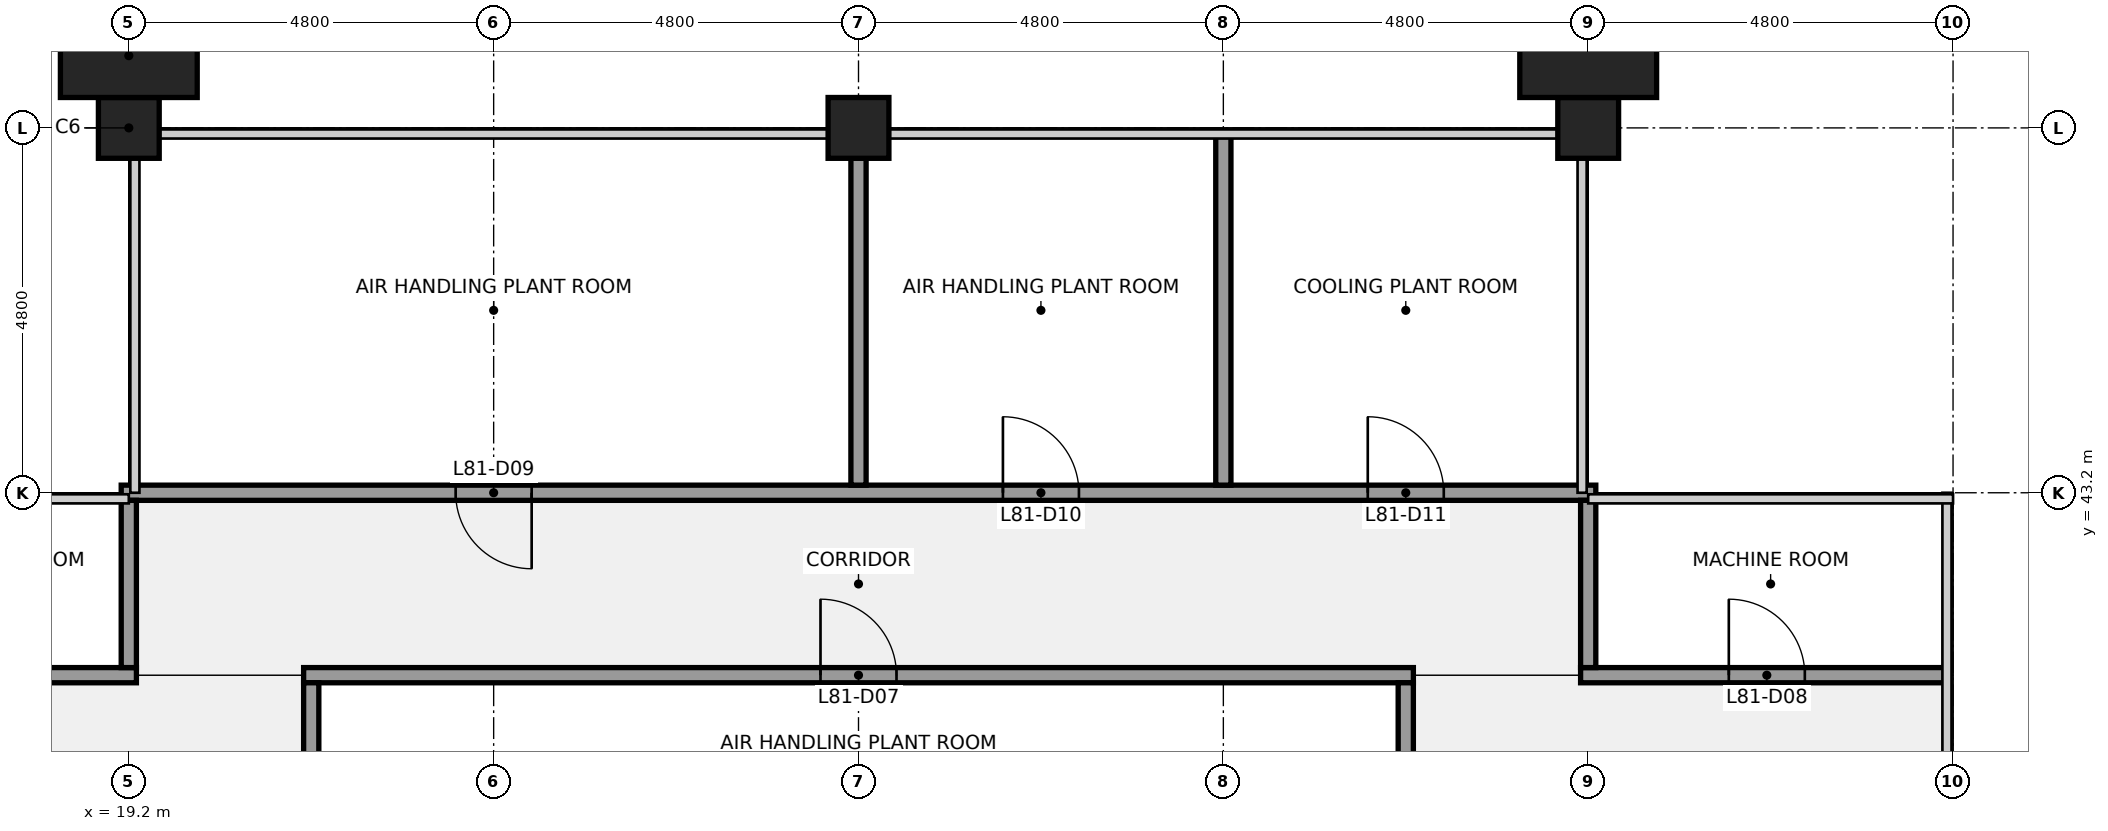
"""IFC4 building model, lengths in metres.
Left out: names, types, materials, properties, quantities, classifications, styles, units other than length and angle.
Written with IfcOpenShell. Run it as: python <this file> out.ifc"""

import sys

from ifc_helpers import new_model, si_unit, direction, frame, frame_2d, origin, origin_2d, place, context, subcontext, project, spatial, rectangle, extrude, element, fill, save


model = new_model("IFC4")
c1 = context("Model", 3, precision=1e-05, world=origin(), true_north=direction((0.0, 1.0)))
c2 = subcontext(c1, "Body", "Model", "MODEL_VIEW")
j1 = project(units=[si_unit("LENGTHUNIT", "METRE"), si_unit("PLANEANGLEUNIT", "RADIAN")], contexts=[c1])
p1 = place(None, origin())
s1 = spatial("IfcSite", under=j1, at=p1, CompositionType="ELEMENT")
p2 = place(p1, origin())
s2 = spatial("IfcBuilding", under=s1, at=p2, CompositionType="ELEMENT")
p3 = place(p2, frame((0.0, 0.0, 362.3)))
s3 = spatial("IfcBuildingStorey", under=s2, at=p3, CompositionType="ELEMENT", Elevation=362.3)
for number, where, z_axis, x_axis in (
    (1, (19.2, 48.0, 0.0), (0.0, 0.0, 1.0), (1.0, 0.0, 0.0)),
    (2, (28.8, 48.0, 0.0), (0.0, 0.0, 1.0), (1.0, 0.0, 0.0)),
    (3, (38.4, 48.0, 0.0), (0.0, 0.0, 1.0), (1.0, 0.0, 0.0)),
):
    element("IfcColumn", number, at=place(p3, frame(where, z_axis=z_axis, x_axis=x_axis)), inside=s3, PredefinedType="COLUMN", context=c2, shape_type="SweptSolid", body=[
        extrude(rectangle(XDim=0.8, YDim=0.8, at=origin_2d()), origin(), (0.0, 0.0, 1.0), 4.0),
    ])
p4 = place(p3, frame((14.5, 40.8, 0.0), z_axis=(0.0, 0.0, 1.0), x_axis=(1.0, 0.0, 0.0)))
e4 = element("IfcWall", 4, at=p4, inside=s3, PredefinedType="PARTITIONING", context=c2, shape_type="SweptSolid", body=[
    extrude(rectangle(XDim=4.8, YDim=0.2, at=frame_2d((2.4, 0.0))), origin(), (0.0, 0.0, 1.0), 2.759),
])
p5 = place(p4, frame((1.85, 0.0, 0.0)))
e5 = element("IfcOpeningElement", 5, at=p5, cuts=e4, PredefinedType="OPENING", context=c2, shape_type="SweptSolid", body=[
    extrude(rectangle(XDim=1.0, YDim=2.1, at=frame_2d((0.5, 1.05))), frame((0.0, 0.11, 0.0), z_axis=(0.0, -1.0, 0.0), x_axis=(1.0, 0.0, 0.0)), (0.0, 0.0, 1.0), 0.22),
])
p6 = place(p3, frame((21.5, 40.8, 0.0), z_axis=(0.0, 0.0, 1.0), x_axis=(1.0, 0.0, 0.0)))
e6 = element("IfcWall", 6, at=p6, inside=s3, PredefinedType="PARTITIONING", context=c2, shape_type="SweptSolid", body=[
    extrude(rectangle(XDim=14.6, YDim=0.2, at=frame_2d((7.3, 0.0))), origin(), (0.0, 0.0, 1.0), 2.759),
])
p7 = place(p6, frame((6.8, 0.0, 0.0)))
e7 = element("IfcOpeningElement", 7, at=p7, cuts=e6, PredefinedType="OPENING", context=c2, shape_type="SweptSolid", body=[
    extrude(rectangle(XDim=1.0, YDim=2.1, at=frame_2d((0.5, 1.05))), frame((0.0, 0.11, 0.0), z_axis=(0.0, -1.0, 0.0), x_axis=(1.0, 0.0, 0.0)), (0.0, 0.0, 1.0), 0.22),
])
p8 = place(p3, frame((38.3, 40.8, 0.0), z_axis=(0.0, 0.0, 1.0), x_axis=(1.0, 0.0, 0.0)))
e8 = element("IfcWall", 8, at=p8, inside=s3, PredefinedType="PARTITIONING", context=c2, shape_type="SweptSolid", body=[
    extrude(rectangle(XDim=4.8, YDim=0.2, at=frame_2d((2.4, 0.0))), origin(), (0.0, 0.0, 1.0), 2.759),
])
p9 = place(p8, frame((1.95, 0.0, 0.0)))
e9 = element("IfcOpeningElement", 9, at=p9, cuts=e8, PredefinedType="OPENING", context=c2, shape_type="SweptSolid", body=[
    extrude(rectangle(XDim=1.0, YDim=2.1, at=frame_2d((0.5, 1.05))), frame((0.0, 0.11, 0.0), z_axis=(0.0, -1.0, 0.0), x_axis=(1.0, 0.0, 0.0)), (0.0, 0.0, 1.0), 0.22),
])
p10 = place(p3, frame((19.1, 43.2, 0.0), z_axis=(0.0, 0.0, 1.0), x_axis=(1.0, 0.0, 0.0)))
e10 = element("IfcWall", 10, at=p10, inside=s3, PredefinedType="PARTITIONING", context=c2, shape_type="SweptSolid", body=[
    extrude(rectangle(XDim=19.4, YDim=0.2, at=frame_2d((9.7, 0.0))), origin(), (0.0, 0.0, 1.0), 2.759),
])
p11 = place(p10, frame((4.4, 0.0, 0.0)))
e11 = element("IfcOpeningElement", 11, at=p11, cuts=e10, PredefinedType="OPENING", context=c2, shape_type="SweptSolid", body=[
    extrude(rectangle(XDim=1.0, YDim=2.1, at=frame_2d((0.5, 1.05))), frame((0.0, 0.11, 0.0), z_axis=(0.0, -1.0, 0.0), x_axis=(1.0, 0.0, 0.0)), (0.0, 0.0, 1.0), 0.22),
])
p12 = place(p10, frame((11.6, 0.0, 0.0)))
e12 = element("IfcOpeningElement", 12, at=p12, cuts=e10, PredefinedType="OPENING", context=c2, shape_type="SweptSolid", body=[
    extrude(rectangle(XDim=1.0, YDim=2.1, at=frame_2d((0.5, 1.05))), frame((0.0, 0.11, 0.0), z_axis=(0.0, -1.0, 0.0), x_axis=(1.0, 0.0, 0.0)), (0.0, 0.0, 1.0), 0.22),
])
p13 = place(p10, frame((16.4, 0.0, 0.0)))
e13 = element("IfcOpeningElement", 13, at=p13, cuts=e10, PredefinedType="OPENING", context=c2, shape_type="SweptSolid", body=[
    extrude(rectangle(XDim=1.0, YDim=2.1, at=frame_2d((0.5, 1.05))), frame((0.0, 0.11, 0.0), z_axis=(0.0, -1.0, 0.0), x_axis=(1.0, 0.0, 0.0)), (0.0, 0.0, 1.0), 0.22),
])
p14 = place(p3, frame((19.2, 40.9, 0.0), z_axis=(0.0, 0.0, 1.0), x_axis=(0.0, 1.0, 0.0)))
e14 = element("IfcWall", 14, at=p14, inside=s3, PredefinedType="PARTITIONING", context=c2, shape_type="SweptSolid", body=[
    extrude(rectangle(XDim=2.2, YDim=0.2, at=frame_2d((1.1, 0.0))), origin(), (0.0, 0.0, 1.0), 2.759),
])
p15 = place(p3, frame((21.6, 38.5, 0.0), z_axis=(0.0, 0.0, 1.0), x_axis=(0.0, 1.0, 0.0)))
e15 = element("IfcWall", 15, at=p15, inside=s3, PredefinedType="PARTITIONING", context=c2, shape_type="SweptSolid", body=[
    extrude(rectangle(XDim=2.2, YDim=0.2, at=frame_2d((1.1, 0.0))), origin(), (0.0, 0.0, 1.0), 2.759),
])
p16 = place(p3, frame((28.8, 43.3, 0.0), z_axis=(0.0, 0.0, 1.0), x_axis=(0.0, 1.0, 0.0)))
e16 = element("IfcWall", 16, at=p16, inside=s3, PredefinedType="PARTITIONING", context=c2, shape_type="SweptSolid", body=[
    extrude(rectangle(XDim=4.3, YDim=0.2, at=frame_2d((2.15, 0.0))), origin(), (0.0, 0.0, 1.0), 2.759),
])
p17 = place(p3, frame((33.6, 43.3, 0.0), z_axis=(0.0, 0.0, 1.0), x_axis=(0.0, 1.0, 0.0)))
e17 = element("IfcWall", 17, at=p17, inside=s3, PredefinedType="PARTITIONING", context=c2, shape_type="SweptSolid", body=[
    extrude(rectangle(XDim=4.6, YDim=0.2, at=frame_2d((2.3, 0.0))), origin(), (0.0, 0.0, 1.0), 2.759),
])
p18 = place(p3, frame((36.0, 38.5, 0.0), z_axis=(0.0, 0.0, 1.0), x_axis=(0.0, 1.0, 0.0)))
e18 = element("IfcWall", 18, at=p18, inside=s3, PredefinedType="PARTITIONING", context=c2, shape_type="SweptSolid", body=[
    extrude(rectangle(XDim=2.2, YDim=0.2, at=frame_2d((1.1, 0.0))), origin(), (0.0, 0.0, 1.0), 2.759),
])
p19 = place(p3, frame((38.4, 40.9, 0.0), z_axis=(0.0, 0.0, 1.0), x_axis=(0.0, 1.0, 0.0)))
e19 = element("IfcWall", 19, at=p19, inside=s3, PredefinedType="PARTITIONING", context=c2, shape_type="SweptSolid", body=[
    extrude(rectangle(XDim=2.2, YDim=0.2, at=frame_2d((1.1, 0.0))), origin(), (0.0, 0.0, 1.0), 2.759),
])
for number, where, z_axis, x_axis in (
    (20, (19.2, 48.95, 0.0), (0.0, 0.0, 1.0), (1.0, 0.0, 0.0)),
    (21, (38.4, 48.95, 0.0), (0.0, 0.0, 1.0), (1.0, 0.0, 0.0)),
):
    element("IfcColumn", number, at=place(p3, frame(where, z_axis=z_axis, x_axis=x_axis)), inside=s3, PredefinedType="PILASTER", context=c2, shape_type="SweptSolid", body=[
        extrude(rectangle(XDim=1.8, YDim=1.1, at=origin_2d()), origin(), (0.0, 0.0, 1.0), 4.0),
    ])
p20 = place(p7, origin())
e22 = element("IfcDoor", 22, at=p20, inside=s3, OperationType="SINGLE_SWING_LEFT", PredefinedType="DOOR", context=c2, shape_type="SweptSolid", body=[
    extrude(rectangle(XDim=1.0, YDim=2.1, at=frame_2d((0.5, 1.05))), frame((0.0, 0.025, 0.0), z_axis=(0.0, -1.0, 0.0), x_axis=(1.0, 0.0, 0.0)), (0.0, 0.0, 1.0), 0.05),
])
fill(e7, e22)
p21 = place(p9, origin())
e23 = element("IfcDoor", 23, at=p21, inside=s3, OperationType="SINGLE_SWING_LEFT", PredefinedType="DOOR", context=c2, shape_type="SweptSolid", body=[
    extrude(rectangle(XDim=1.0, YDim=2.1, at=frame_2d((0.5, 1.05))), frame((0.0, 0.025, 0.0), z_axis=(0.0, -1.0, 0.0), x_axis=(1.0, 0.0, 0.0)), (0.0, 0.0, 1.0), 0.05),
])
fill(e9, e23)
p22 = place(p11, origin())
e24 = element("IfcDoor", 24, at=p22, inside=s3, OperationType="SINGLE_SWING_RIGHT", PredefinedType="DOOR", context=c2, shape_type="SweptSolid", body=[
    extrude(rectangle(XDim=1.0, YDim=2.1, at=frame_2d((0.5, 1.05))), frame((0.0, 0.025, 0.0), z_axis=(0.0, -1.0, 0.0), x_axis=(1.0, 0.0, 0.0)), (0.0, 0.0, 1.0), 0.05),
])
fill(e11, e24)
p23 = place(p12, origin())
e25 = element("IfcDoor", 25, at=p23, inside=s3, OperationType="SINGLE_SWING_LEFT", PredefinedType="DOOR", context=c2, shape_type="SweptSolid", body=[
    extrude(rectangle(XDim=1.0, YDim=2.1, at=frame_2d((0.5, 1.05))), frame((0.0, 0.025, 0.0), z_axis=(0.0, -1.0, 0.0), x_axis=(1.0, 0.0, 0.0)), (0.0, 0.0, 1.0), 0.05),
])
fill(e12, e25)
p24 = place(p13, origin())
e26 = element("IfcDoor", 26, at=p24, inside=s3, OperationType="SINGLE_SWING_LEFT", PredefinedType="DOOR", context=c2, shape_type="SweptSolid", body=[
    extrude(rectangle(XDim=1.0, YDim=2.1, at=frame_2d((0.5, 1.05))), frame((0.0, 0.025, 0.0), z_axis=(0.0, -1.0, 0.0), x_axis=(1.0, 0.0, 0.0)), (0.0, 0.0, 1.0), 0.05),
])
fill(e13, e26)
save(model, sys.argv[1])
